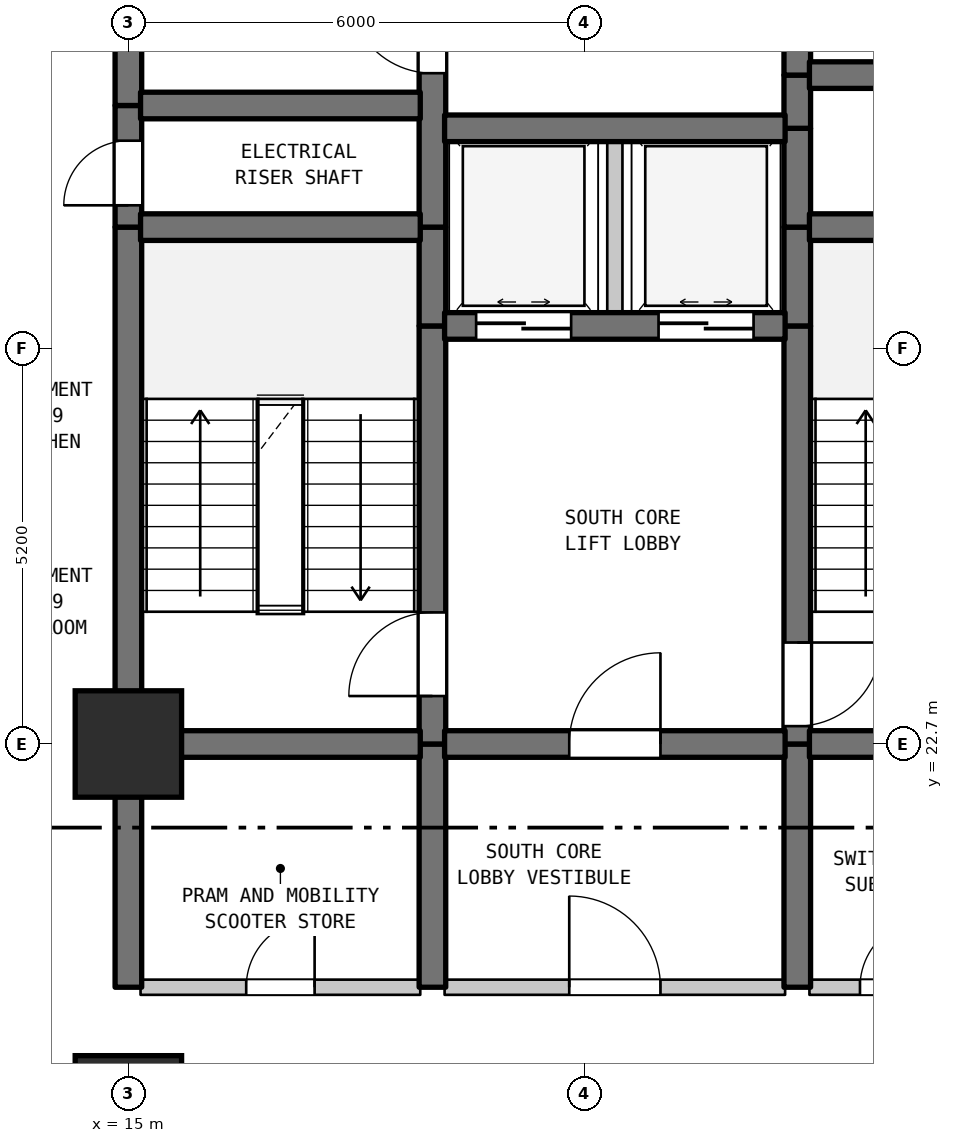
"""IFC4 building model, lengths in metres.
Left out: names, types, materials, properties, quantities, classifications, styles, units other than length and angle.
Written with IfcOpenShell. Run it as: python <this file> out.ifc"""

import sys

from ifc_helpers import new_model, si_unit, direction, frame, frame_2d, origin, origin_2d, place, context, subcontext, project, spatial, rectangle, extrude, element, fill, save


model = new_model("IFC4")
c1 = context("Model", 3, precision=1e-05, world=origin(), true_north=direction((0.0, 1.0)))
c2 = subcontext(c1, "Body", "Model", "MODEL_VIEW")
j1 = project(units=[si_unit("LENGTHUNIT", "METRE"), si_unit("PLANEANGLEUNIT", "RADIAN")], contexts=[c1])
p1 = place(None, origin())
s1 = spatial("IfcSite", under=j1, at=p1, CompositionType="ELEMENT")
p2 = place(p1, origin())
s2 = spatial("IfcBuilding", under=s1, at=p2, CompositionType="ELEMENT")
p3 = place(p2, frame((0.0, 0.0, 27.7)))
s3 = spatial("IfcBuildingStorey", under=s2, at=p3, CompositionType="ELEMENT", Elevation=27.7)
for number, where, z_axis, x_axis in (
    (1, (15.0, 17.9, 0.0), (0.0, 0.0, 1.0), (1.0, 0.0, 0.0)),
    (2, (15.0, 22.7, 0.0), (0.0, 0.0, 1.0), (1.0, 0.0, 0.0)),
):
    element("IfcColumn", number, at=place(p3, frame(where, z_axis=z_axis, x_axis=x_axis)), inside=s3, PredefinedType="COLUMN", context=c2, shape_type="SweptSolid", body=[
        extrude(rectangle(XDim=1.4, YDim=1.4, at=origin_2d()), origin(), (0.0, 0.0, 1.0), 3.7),
    ])
p4 = place(p3, frame((15.0, 19.5, 0.0), z_axis=(0.0, 0.0, 1.0), x_axis=(0.0, 1.0, 0.0)))
e3 = element("IfcWall", 3, at=p4, inside=s3, PredefinedType="SHEAR", context=c2, shape_type="SweptSolid", body=[
    extrude(rectangle(XDim=3.2, YDim=0.35, at=frame_2d((1.6, 0.0))), origin(), (0.0, 0.0, 1.0), 3.385),
])
p5 = place(p3, frame((15.0, 22.7, 0.0), z_axis=(0.0, 0.0, 1.0), x_axis=(0.0, 1.0, 0.0)))
e4 = element("IfcWall", 4, at=p5, inside=s3, PredefinedType="SHEAR", context=c2, shape_type="SweptSolid", body=[
    extrude(rectangle(XDim=6.8, YDim=0.35, at=frame_2d((3.4, 0.0))), origin(), (0.0, 0.0, 1.0), 3.385),
])
p6 = place(p3, frame((15.0, 29.5, 0.0), z_axis=(0.0, 0.0, 1.0), x_axis=(0.0, 1.0, 0.0)))
e5 = element("IfcWall", 5, at=p6, inside=s3, PredefinedType="SHEAR", context=c2, shape_type="SweptSolid", body=[
    extrude(rectangle(XDim=1.6, YDim=0.35, at=frame_2d((0.8, 0.0))), origin(), (0.0, 0.0, 1.0), 3.385),
])
p7 = place(p6, frame((0.287, 0.0, 0.0)))
e6 = element("IfcOpeningElement", 6, at=p7, cuts=e5, PredefinedType="OPENING", context=c2, shape_type="SweptSolid", body=[
    extrude(rectangle(XDim=0.85, YDim=2.1, at=frame_2d((0.425, 1.05))), frame((0.0, 0.185, 0.0), z_axis=(0.0, -1.0, 0.0), x_axis=(1.0, 0.0, 0.0)), (0.0, 0.0, 1.0), 0.37),
])
p8 = place(p3, frame((15.0, 31.1, 0.0), z_axis=(0.0, 0.0, 1.0), x_axis=(0.0, 1.0, 0.0)))
e7 = element("IfcWall", 7, at=p8, inside=s3, PredefinedType="SHEAR", context=c2, shape_type="SweptSolid", body=[
    extrude(rectangle(XDim=6.8, YDim=0.35, at=frame_2d((3.4, 0.0))), origin(), (0.0, 0.0, 1.0), 3.385),
])
p9 = place(p3, frame((19.0, 19.5, 0.0), z_axis=(0.0, 0.0, 1.0), x_axis=(0.0, 1.0, 0.0)))
e8 = element("IfcWall", 8, at=p9, inside=s3, PredefinedType="SHEAR", context=c2, shape_type="SweptSolid", body=[
    extrude(rectangle(XDim=3.2, YDim=0.35, at=frame_2d((1.6, 0.0))), origin(), (0.0, 0.0, 1.0), 3.385),
])
p10 = place(p3, frame((19.0, 22.7, 0.0), z_axis=(0.0, 0.0, 1.0), x_axis=(0.0, 1.0, 0.0)))
e9 = element("IfcWall", 9, at=p10, inside=s3, PredefinedType="SHEAR", context=c2, shape_type="SweptSolid", body=[
    extrude(rectangle(XDim=5.5, YDim=0.35, at=frame_2d((2.75, 0.0))), origin(), (0.0, 0.0, 1.0), 3.385),
])
p11 = place(p10, frame((0.631, 0.0, 0.0)))
e10 = element("IfcOpeningElement", 10, at=p11, cuts=e9, PredefinedType="OPENING", context=c2, shape_type="SweptSolid", body=[
    extrude(rectangle(XDim=1.1, YDim=2.15, at=frame_2d((0.55, 1.075))), frame((0.0, 0.185, 0.0), z_axis=(0.0, -1.0, 0.0), x_axis=(1.0, 0.0, 0.0)), (0.0, 0.0, 1.0), 0.37),
])
p12 = place(p3, frame((19.0, 28.2, 0.0), z_axis=(0.0, 0.0, 1.0), x_axis=(0.0, 1.0, 0.0)))
e11 = element("IfcWall", 11, at=p12, inside=s3, PredefinedType="SHEAR", context=c2, shape_type="SweptSolid", body=[
    extrude(rectangle(XDim=1.3, YDim=0.35, at=frame_2d((0.65, 0.0))), origin(), (0.0, 0.0, 1.0), 3.385),
])
p13 = place(p3, frame((19.0, 29.5, 0.0), z_axis=(0.0, 0.0, 1.0), x_axis=(0.0, 1.0, 0.0)))
e12 = element("IfcWall", 12, at=p13, inside=s3, PredefinedType="SHEAR", context=c2, shape_type="SweptSolid", body=[
    extrude(rectangle(XDim=5.5, YDim=0.35, at=frame_2d((2.75, 0.0))), origin(), (0.0, 0.0, 1.0), 3.385),
])
p14 = place(p13, frame((2.025, 0.0, 0.0)))
e13 = element("IfcOpeningElement", 13, at=p14, cuts=e12, PredefinedType="OPENING", context=c2, shape_type="SweptSolid", body=[
    extrude(rectangle(XDim=1.1, YDim=2.15, at=frame_2d((0.55, 1.075))), frame((0.0, 0.185, 0.0), z_axis=(0.0, -1.0, 0.0), x_axis=(1.0, 0.0, 0.0)), (0.0, 0.0, 1.0), 0.37),
])
p15 = place(p3, frame((21.4, 28.2, 0.0), z_axis=(0.0, 0.0, 1.0), x_axis=(0.0, 1.0, 0.0)))
e14 = element("IfcWall", 14, at=p15, inside=s3, PredefinedType="STANDARD", context=c2, shape_type="SweptSolid", body=[
    extrude(rectangle(XDim=2.6, YDim=0.2, at=frame_2d((1.3, 0.0))), origin(), (0.0, 0.0, 1.0), 3.385),
])
p16 = place(p3, frame((23.8, 19.5, 0.0), z_axis=(0.0, 0.0, 1.0), x_axis=(0.0, 1.0, 0.0)))
e15 = element("IfcWall", 15, at=p16, inside=s3, PredefinedType="SHEAR", context=c2, shape_type="SweptSolid", body=[
    extrude(rectangle(XDim=3.2, YDim=0.35, at=frame_2d((1.6, 0.0))), origin(), (0.0, 0.0, 1.0), 3.385),
])
p17 = place(p3, frame((23.8, 22.7, 0.0), z_axis=(0.0, 0.0, 1.0), x_axis=(0.0, 1.0, 0.0)))
e16 = element("IfcWall", 16, at=p17, inside=s3, PredefinedType="SHEAR", context=c2, shape_type="SweptSolid", body=[
    extrude(rectangle(XDim=5.5, YDim=0.35, at=frame_2d((2.75, 0.0))), origin(), (0.0, 0.0, 1.0), 3.385),
])
p18 = place(p17, frame((0.235, 0.0, 0.0)))
e17 = element("IfcOpeningElement", 17, at=p18, cuts=e16, PredefinedType="OPENING", context=c2, shape_type="SweptSolid", body=[
    extrude(rectangle(XDim=1.1, YDim=2.15, at=frame_2d((0.55, 1.075))), frame((0.0, 0.185, 0.0), z_axis=(0.0, -1.0, 0.0), x_axis=(1.0, 0.0, 0.0)), (0.0, 0.0, 1.0), 0.37),
])
for number, where, z_axis, x_axis in (
    (18, (23.8, 28.2, 0.0), (0.0, 0.0, 1.0), (0.0, 1.0, 0.0)),
    (19, (23.8, 29.5, 0.0), (0.0, 0.0, 1.0), (0.0, 1.0, 0.0)),
):
    element("IfcWall", number, at=place(p3, frame(where, z_axis=z_axis, x_axis=x_axis)), inside=s3, PredefinedType="SHEAR", context=c2, shape_type="SweptSolid", body=[
        extrude(rectangle(XDim=1.3, YDim=0.35, at=frame_2d((0.65, 0.0))), origin(), (0.0, 0.0, 1.0), 3.385),
    ])
p19 = place(p3, frame((23.8, 30.8, 0.0), z_axis=(0.0, 0.0, 1.0), x_axis=(0.0, 1.0, 0.0)))
e20 = element("IfcWall", 20, at=p19, inside=s3, PredefinedType="SHEAR", context=c2, shape_type="SweptSolid", body=[
    extrude(rectangle(XDim=0.7, YDim=0.35, at=frame_2d((0.35, 0.0))), origin(), (0.0, 0.0, 1.0), 3.385),
])
p20 = place(p3, frame((23.8, 31.5, 0.0), z_axis=(0.0, 0.0, 1.0), x_axis=(0.0, 1.0, 0.0)))
e21 = element("IfcWall", 21, at=p20, inside=s3, PredefinedType="SHEAR", context=c2, shape_type="SweptSolid", body=[
    extrude(rectangle(XDim=3.5, YDim=0.35, at=frame_2d((1.75, 0.0))), origin(), (0.0, 0.0, 1.0), 3.385),
])
p21 = place(p20, frame((1.127, 0.0, 0.0)))
e22 = element("IfcOpeningElement", 22, at=p21, cuts=e21, PredefinedType="OPENING", context=c2, shape_type="SweptSolid", body=[
    extrude(rectangle(XDim=1.1, YDim=2.15, at=frame_2d((0.55, 1.075))), frame((0.0, 0.185, 0.0), z_axis=(0.0, -1.0, 0.0), x_axis=(1.0, 0.0, 0.0)), (0.0, 0.0, 1.0), 0.37),
])
p22 = place(p3, frame((15.16, 19.5, 0.0), z_axis=(0.0, 0.0, 1.0), x_axis=(1.0, 0.0, 0.0)))
e23 = element("IfcWall", 23, at=p22, inside=s3, PredefinedType="STANDARD", context=c2, shape_type="SweptSolid", body=[
    extrude(rectangle(XDim=3.68, YDim=0.2, at=frame_2d((1.84, 0.0))), origin(), (0.0, 0.0, 1.0), 3.385),
])
p23 = place(p22, frame((1.39, 0.0, 0.0)))
e24 = element("IfcOpeningElement", 24, at=p23, cuts=e23, PredefinedType="OPENING", context=c2, shape_type="SweptSolid", body=[
    extrude(rectangle(XDim=0.9, YDim=2.15, at=frame_2d((0.45, 1.075))), frame((0.0, 0.11, 0.0), z_axis=(0.0, -1.0, 0.0), x_axis=(1.0, 0.0, 0.0)), (0.0, 0.0, 1.0), 0.22),
])
p24 = place(p3, frame((19.16, 19.5, 0.0), z_axis=(0.0, 0.0, 1.0), x_axis=(1.0, 0.0, 0.0)))
e25 = element("IfcWall", 25, at=p24, inside=s3, PredefinedType="STANDARD", context=c2, shape_type="SweptSolid", body=[
    extrude(rectangle(XDim=4.48, YDim=0.2, at=frame_2d((2.24, 0.0))), origin(), (0.0, 0.0, 1.0), 3.385),
])
p25 = place(p24, frame((1.64, 0.0, 0.0)))
e26 = element("IfcOpeningElement", 26, at=p25, cuts=e25, PredefinedType="OPENING", context=c2, shape_type="SweptSolid", body=[
    extrude(rectangle(XDim=1.2, YDim=2.2, at=frame_2d((0.6, 1.1))), frame((0.0, 0.11, 0.0), z_axis=(0.0, -1.0, 0.0), x_axis=(1.0, 0.0, 0.0)), (0.0, 0.0, 1.0), 0.22),
])
p26 = place(p3, frame((23.96, 19.5, 0.0), z_axis=(0.0, 0.0, 1.0), x_axis=(1.0, 0.0, 0.0)))
e27 = element("IfcWall", 27, at=p26, inside=s3, PredefinedType="STANDARD", context=c2, shape_type="SweptSolid", body=[
    extrude(rectangle(XDim=4.455, YDim=0.2, at=frame_2d((2.228, 0.0))), origin(), (0.0, 0.0, 1.0), 3.385),
])
p27 = place(p26, frame((0.665, 0.0, 0.0)))
e28 = element("IfcOpeningElement", 28, at=p27, cuts=e27, PredefinedType="OPENING", context=c2, shape_type="SweptSolid", body=[
    extrude(rectangle(XDim=0.9, YDim=2.15, at=frame_2d((0.45, 1.075))), frame((0.0, 0.11, 0.0), z_axis=(0.0, -1.0, 0.0), x_axis=(1.0, 0.0, 0.0)), (0.0, 0.0, 1.0), 0.22),
])
p28 = place(p26, frame((2.791, 0.0, 0.0)))
e29 = element("IfcOpeningElement", 29, at=p28, cuts=e27, PredefinedType="OPENING", context=c2, shape_type="SweptSolid", body=[
    extrude(rectangle(XDim=0.9, YDim=2.15, at=frame_2d((0.45, 1.075))), frame((0.0, 0.11, 0.0), z_axis=(0.0, -1.0, 0.0), x_axis=(1.0, 0.0, 0.0)), (0.0, 0.0, 1.0), 0.22),
])
p29 = place(p3, frame((15.16, 22.7, 0.0), z_axis=(0.0, 0.0, 1.0), x_axis=(1.0, 0.0, 0.0)))
e30 = element("IfcWall", 30, at=p29, inside=s3, PredefinedType="SHEAR", context=c2, shape_type="SweptSolid", body=[
    extrude(rectangle(XDim=3.68, YDim=0.35, at=frame_2d((1.84, 0.0))), origin(), (0.0, 0.0, 1.0), 3.385),
])
p30 = place(p3, frame((19.16, 22.7, 0.0), z_axis=(0.0, 0.0, 1.0), x_axis=(1.0, 0.0, 0.0)))
e31 = element("IfcWall", 31, at=p30, inside=s3, PredefinedType="SHEAR", context=c2, shape_type="SweptSolid", body=[
    extrude(rectangle(XDim=4.48, YDim=0.35, at=frame_2d((2.24, 0.0))), origin(), (0.0, 0.0, 1.0), 3.385),
])
p31 = place(p30, frame((1.64, 0.0, 0.0)))
e32 = element("IfcOpeningElement", 32, at=p31, cuts=e31, PredefinedType="OPENING", context=c2, shape_type="SweptSolid", body=[
    extrude(rectangle(XDim=1.2, YDim=2.2, at=frame_2d((0.6, 1.1))), frame((0.0, 0.185, 0.0), z_axis=(0.0, -1.0, 0.0), x_axis=(1.0, 0.0, 0.0)), (0.0, 0.0, 1.0), 0.37),
])
p32 = place(p3, frame((23.96, 22.7, 0.0), z_axis=(0.0, 0.0, 1.0), x_axis=(1.0, 0.0, 0.0)))
e33 = element("IfcWall", 33, at=p32, inside=s3, PredefinedType="SHEAR", context=c2, shape_type="SweptSolid", body=[
    extrude(rectangle(XDim=3.18, YDim=0.35, at=frame_2d((1.59, 0.0))), origin(), (0.0, 0.0, 1.0), 3.385),
])
p33 = place(p3, frame((19.16, 28.2, 0.0), z_axis=(0.0, 0.0, 1.0), x_axis=(1.0, 0.0, 0.0)))
e34 = element("IfcWall", 34, at=p33, inside=s3, PredefinedType="SHEAR", context=c2, shape_type="SweptSolid", body=[
    extrude(rectangle(XDim=4.48, YDim=0.35, at=frame_2d((2.24, 0.0))), origin(), (0.0, 0.0, 1.0), 3.385),
])
p34 = place(p33, frame((0.415, 0.0, 0.0)))
e35 = element("IfcOpeningElement", 35, at=p34, cuts=e34, PredefinedType="OPENING", context=c2, shape_type="SweptSolid", body=[
    extrude(rectangle(XDim=1.25, YDim=2.2, at=frame_2d((0.625, 1.1))), frame((0.0, 0.185, 0.0), z_axis=(0.0, -1.0, 0.0), x_axis=(1.0, 0.0, 0.0)), (0.0, 0.0, 1.0), 0.37),
])
p35 = place(p33, frame((2.815, 0.0, 0.0)))
e36 = element("IfcOpeningElement", 36, at=p35, cuts=e34, PredefinedType="OPENING", context=c2, shape_type="SweptSolid", body=[
    extrude(rectangle(XDim=1.25, YDim=2.2, at=frame_2d((0.625, 1.1))), frame((0.0, 0.185, 0.0), z_axis=(0.0, -1.0, 0.0), x_axis=(1.0, 0.0, 0.0)), (0.0, 0.0, 1.0), 0.37),
])
p36 = place(p3, frame((15.16, 29.5, 0.0), z_axis=(0.0, 0.0, 1.0), x_axis=(1.0, 0.0, 0.0)))
e37 = element("IfcWall", 37, at=p36, inside=s3, PredefinedType="SHEAR", context=c2, shape_type="SweptSolid", body=[
    extrude(rectangle(XDim=3.68, YDim=0.35, at=frame_2d((1.84, 0.0))), origin(), (0.0, 0.0, 1.0), 3.385),
])
p37 = place(p3, frame((23.96, 29.5, 0.0), z_axis=(0.0, 0.0, 1.0), x_axis=(1.0, 0.0, 0.0)))
e38 = element("IfcWall", 38, at=p37, inside=s3, PredefinedType="SHEAR", context=c2, shape_type="SweptSolid", body=[
    extrude(rectangle(XDim=3.18, YDim=0.35, at=frame_2d((1.59, 0.0))), origin(), (0.0, 0.0, 1.0), 3.385),
])
p38 = place(p3, frame((19.16, 30.8, 0.0), z_axis=(0.0, 0.0, 1.0), x_axis=(1.0, 0.0, 0.0)))
e39 = element("IfcWall", 39, at=p38, inside=s3, PredefinedType="SHEAR", context=c2, shape_type="SweptSolid", body=[
    extrude(rectangle(XDim=4.48, YDim=0.35, at=frame_2d((2.24, 0.0))), origin(), (0.0, 0.0, 1.0), 3.385),
])
p39 = place(p3, frame((15.16, 31.1, 0.0), z_axis=(0.0, 0.0, 1.0), x_axis=(1.0, 0.0, 0.0)))
e40 = element("IfcWall", 40, at=p39, inside=s3, PredefinedType="SHEAR", context=c2, shape_type="SweptSolid", body=[
    extrude(rectangle(XDim=3.68, YDim=0.35, at=frame_2d((1.84, 0.0))), origin(), (0.0, 0.0, 1.0), 3.385),
])
p40 = place(p3, frame((23.96, 31.5, 0.0), z_axis=(0.0, 0.0, 1.0), x_axis=(1.0, 0.0, 0.0)))
e41 = element("IfcWall", 41, at=p40, inside=s3, PredefinedType="SHEAR", context=c2, shape_type="SweptSolid", body=[
    extrude(rectangle(XDim=3.18, YDim=0.35, at=frame_2d((1.59, 0.0))), origin(), (0.0, 0.0, 1.0), 3.385),
])
p41 = place(p40, frame((1.094, 0.0, 0.0)))
e42 = element("IfcOpeningElement", 42, at=p41, cuts=e41, PredefinedType="OPENING", context=c2, shape_type="SweptSolid", body=[
    extrude(rectangle(XDim=0.85, YDim=2.1, at=frame_2d((0.425, 1.05))), frame((0.0, 0.185, 0.0), z_axis=(0.0, -1.0, 0.0), x_axis=(1.0, 0.0, 0.0)), (0.0, 0.0, 1.0), 0.37),
])
p42 = place(p7, origin())
e43 = element("IfcDoor", 43, at=p42, inside=s3, OperationType="SINGLE_SWING_LEFT", PredefinedType="DOOR", context=c2, shape_type="SweptSolid", body=[
    extrude(rectangle(XDim=0.85, YDim=2.1, at=frame_2d((0.425, 1.05))), frame((0.0, 0.025, 0.0), z_axis=(0.0, -1.0, 0.0), x_axis=(1.0, 0.0, 0.0)), (0.0, 0.0, 1.0), 0.05),
])
fill(e6, e43)
p43 = place(p11, origin())
e44 = element("IfcDoor", 44, at=p43, inside=s3, OperationType="SINGLE_SWING_LEFT", PredefinedType="DOOR", context=c2, shape_type="SweptSolid", body=[
    extrude(rectangle(XDim=1.1, YDim=2.15, at=frame_2d((0.55, 1.075))), frame((0.0, 0.025, 0.0), z_axis=(0.0, -1.0, 0.0), x_axis=(1.0, 0.0, 0.0)), (0.0, 0.0, 1.0), 0.05),
])
fill(e10, e44)
p44 = place(p14, origin())
e45 = element("IfcDoor", 45, at=p44, inside=s3, OperationType="SINGLE_SWING_RIGHT", PredefinedType="DOOR", context=c2, shape_type="SweptSolid", body=[
    extrude(rectangle(XDim=1.1, YDim=2.15, at=frame_2d((0.55, 1.075))), frame((0.0, 0.025, 0.0), z_axis=(0.0, -1.0, 0.0), x_axis=(1.0, 0.0, 0.0)), (0.0, 0.0, 1.0), 0.05),
])
fill(e13, e45)
p45 = place(p18, frame((1.1, 0.0, 0.0), z_axis=(0.0, 0.0, 1.0), x_axis=(-1.0, 0.0, 0.0)))
e46 = element("IfcDoor", 46, at=p45, inside=s3, OperationType="SINGLE_SWING_RIGHT", PredefinedType="DOOR", context=c2, shape_type="SweptSolid", body=[
    extrude(rectangle(XDim=1.1, YDim=2.15, at=frame_2d((0.55, 1.075))), frame((0.0, 0.025, 0.0), z_axis=(0.0, -1.0, 0.0), x_axis=(1.0, 0.0, 0.0)), (0.0, 0.0, 1.0), 0.05),
])
fill(e17, e46)
p46 = place(p23, origin())
e47 = element("IfcDoor", 47, at=p46, inside=s3, OperationType="SINGLE_SWING_RIGHT", PredefinedType="DOOR", context=c2, shape_type="SweptSolid", body=[
    extrude(rectangle(XDim=0.9, YDim=2.15, at=frame_2d((0.45, 1.075))), frame((0.0, 0.025, 0.0), z_axis=(0.0, -1.0, 0.0), x_axis=(1.0, 0.0, 0.0)), (0.0, 0.0, 1.0), 0.05),
])
fill(e24, e47)
p47 = place(p25, origin())
e48 = element("IfcDoor", 48, at=p47, inside=s3, OperationType="SINGLE_SWING_LEFT", PredefinedType="DOOR", context=c2, shape_type="SweptSolid", body=[
    extrude(rectangle(XDim=1.2, YDim=2.2, at=frame_2d((0.6, 1.1))), frame((0.0, 0.025, 0.0), z_axis=(0.0, -1.0, 0.0), x_axis=(1.0, 0.0, 0.0)), (0.0, 0.0, 1.0), 0.05),
])
fill(e26, e48)
p48 = place(p27, origin())
e49 = element("IfcDoor", 49, at=p48, inside=s3, OperationType="SINGLE_SWING_RIGHT", PredefinedType="DOOR", context=c2, shape_type="SweptSolid", body=[
    extrude(rectangle(XDim=0.9, YDim=2.15, at=frame_2d((0.45, 1.075))), frame((0.0, 0.025, 0.0), z_axis=(0.0, -1.0, 0.0), x_axis=(1.0, 0.0, 0.0)), (0.0, 0.0, 1.0), 0.05),
])
fill(e28, e49)
p49 = place(p31, origin())
e50 = element("IfcDoor", 50, at=p49, inside=s3, OperationType="SINGLE_SWING_RIGHT", PredefinedType="DOOR", context=c2, shape_type="SweptSolid", body=[
    extrude(rectangle(XDim=1.2, YDim=2.2, at=frame_2d((0.6, 1.1))), frame((0.0, 0.025, 0.0), z_axis=(0.0, -1.0, 0.0), x_axis=(1.0, 0.0, 0.0)), (0.0, 0.0, 1.0), 0.05),
])
fill(e32, e50)
p50 = place(p34, origin())
e51 = element("IfcDoor", 51, at=p50, inside=s3, OperationType="DOUBLE_DOOR_SLIDING", PredefinedType="DOOR", context=c2, shape_type="SweptSolid", body=[
    extrude(rectangle(XDim=1.25, YDim=2.2, at=frame_2d((0.625, 1.1))), frame((0.0, 0.025, 0.0), z_axis=(0.0, -1.0, 0.0), x_axis=(1.0, 0.0, 0.0)), (0.0, 0.0, 1.0), 0.05),
])
fill(e35, e51)
p51 = place(p35, origin())
e52 = element("IfcDoor", 52, at=p51, inside=s3, OperationType="DOUBLE_DOOR_SLIDING", PredefinedType="DOOR", context=c2, shape_type="SweptSolid", body=[
    extrude(rectangle(XDim=1.25, YDim=2.2, at=frame_2d((0.625, 1.1))), frame((0.0, 0.025, 0.0), z_axis=(0.0, -1.0, 0.0), x_axis=(1.0, 0.0, 0.0)), (0.0, 0.0, 1.0), 0.05),
])
fill(e36, e52)
save(model, sys.argv[1])
